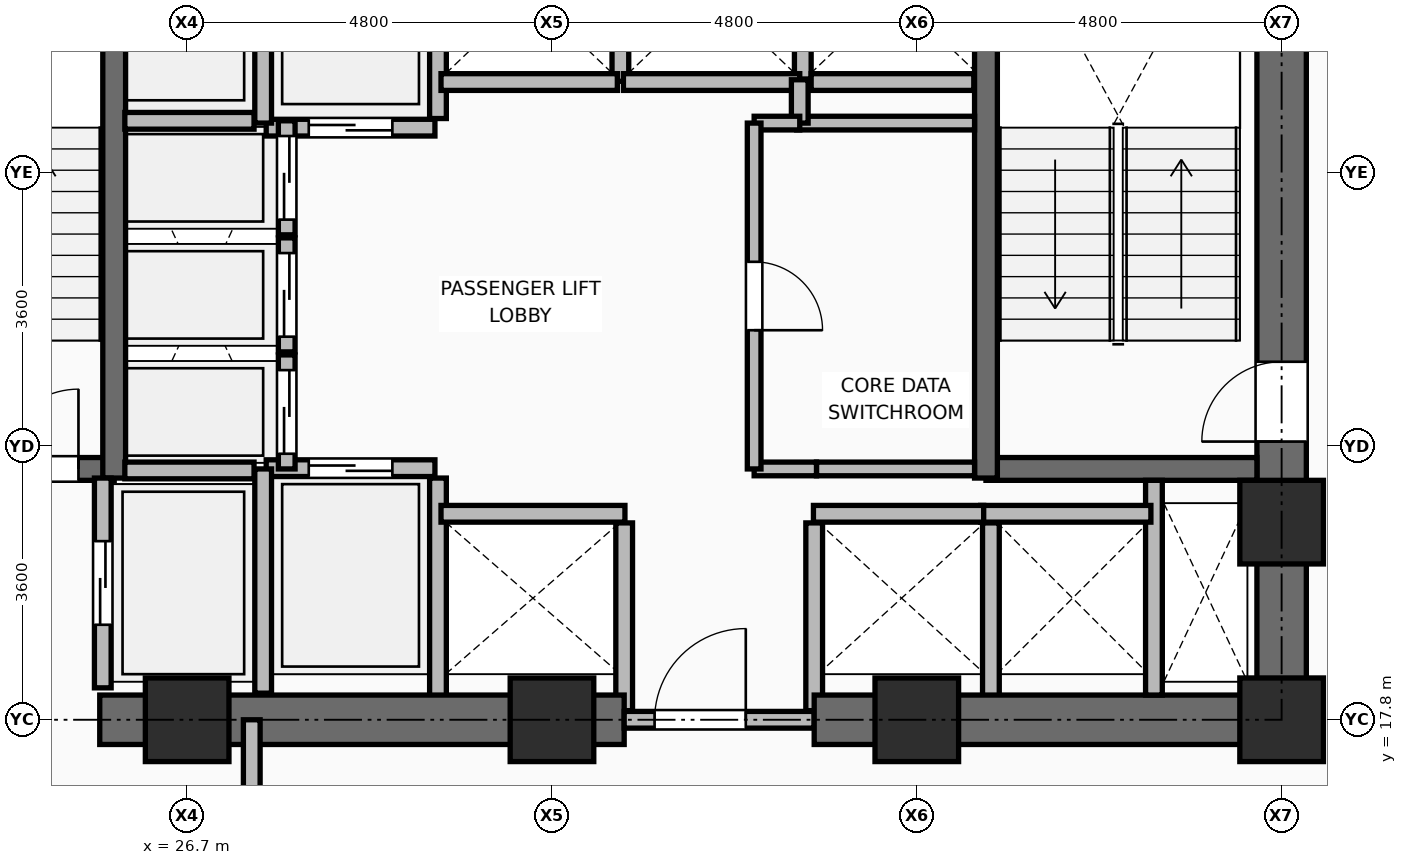
"""IFC4 building model, lengths in metres.
Left out: names, types, materials, properties, quantities, classifications, styles, units other than length and angle.
Written with IfcOpenShell. Run it as: python <this file> out.ifc"""

import sys

from ifc_helpers import new_model, si_unit, direction, frame, frame_2d, origin, origin_2d, place, context, subcontext, project, spatial, rectangle, extrude, element, fill, save


model = new_model("IFC4")
c1 = context("Model", 3, precision=1e-05, world=origin(), true_north=direction((0.0, 1.0)))
c2 = subcontext(c1, "Body", "Model", "MODEL_VIEW")
j1 = project(units=[si_unit("LENGTHUNIT", "METRE"), si_unit("PLANEANGLEUNIT", "RADIAN")], contexts=[c1])
p1 = place(None, origin())
s1 = spatial("IfcSite", under=j1, at=p1, CompositionType="ELEMENT")
p2 = place(p1, origin())
s2 = spatial("IfcBuilding", under=s1, at=p2, CompositionType="ELEMENT")
p3 = place(p2, frame((0.0, 0.0, 72.0)))
s3 = spatial("IfcBuildingStorey", under=s2, at=p3, CompositionType="ELEMENT", Elevation=72.0)
for number, where, z_axis, x_axis in (
    (1, (26.7, 17.8, 0.0), (0.0, 0.0, 1.0), (1.0, 0.0, 0.0)),
    (2, (31.5, 17.8, 0.0), (0.0, 0.0, 1.0), (1.0, 0.0, 0.0)),
    (3, (36.3, 17.8, 0.0), (0.0, 0.0, 1.0), (1.0, 0.0, 0.0)),
    (4, (41.1, 17.8, 0.0), (0.0, 0.0, 1.0), (1.0, 0.0, 0.0)),
    (5, (41.1, 20.4, 0.0), (0.0, 0.0, 1.0), (1.0, 0.0, 0.0)),
):
    element("IfcColumn", number, at=place(p3, frame(where, z_axis=z_axis, x_axis=x_axis)), inside=s3, PredefinedType="COLUMN", context=c2, shape_type="SweptSolid", body=[
        extrude(rectangle(XDim=1.1, YDim=1.1, at=origin_2d()), origin(), (0.0, 0.0, 1.0), 3.75),
    ])
p4 = place(p3, frame((30.0, 18.08, 0.0), z_axis=(0.0, 0.0, 1.0), x_axis=(0.0, 1.0, 0.0)))
e6 = element("IfcWall", 6, at=p4, inside=s3, PredefinedType="PARTITIONING", context=c2, shape_type="SweptSolid", body=[
    extrude(rectangle(XDim=2.9, YDim=0.22, at=frame_2d((1.45, 0.0))), origin(), (0.0, 0.0, 1.0), 3.545),
])
for number, where, z_axis, x_axis in (
    (7, (32.45, 17.92, 0.0), (0.0, 0.0, 1.0), (0.0, 1.0, 0.0)),
    (8, (34.95, 17.92, 0.0), (0.0, 0.0, 1.0), (0.0, 1.0, 0.0)),
):
    element("IfcWall", number, at=place(p3, frame(where, z_axis=z_axis, x_axis=x_axis)), inside=s3, PredefinedType="PARTITIONING", context=c2, shape_type="SweptSolid", body=[
        extrude(rectangle(XDim=2.47, YDim=0.22, at=frame_2d((1.235, 0.0))), origin(), (0.0, 0.0, 1.0), 2.928),
    ])
p5 = place(p3, frame((37.275, 18.08, 0.0), z_axis=(0.0, 0.0, 1.0), x_axis=(0.0, 1.0, 0.0)))
e9 = element("IfcWall", 9, at=p5, inside=s3, PredefinedType="PARTITIONING", context=c2, shape_type="SweptSolid", body=[
    extrude(rectangle(XDim=2.31, YDim=0.22, at=frame_2d((1.155, 0.0))), origin(), (0.0, 0.0, 1.0), 3.545),
])
p6 = place(p3, frame((30.0, 25.71, 0.0), z_axis=(0.0, 0.0, 1.0), x_axis=(0.0, 1.0, 0.0)))
e10 = element("IfcWall", 10, at=p6, inside=s3, PredefinedType="PARTITIONING", context=c2, shape_type="SweptSolid", body=[
    extrude(rectangle(XDim=2.73, YDim=0.22, at=frame_2d((1.365, 0.0))), origin(), (0.0, 0.0, 1.0), 3.545),
])
p7 = place(p3, frame((32.4, 26.2, 0.0), z_axis=(0.0, 0.0, 1.0), x_axis=(0.0, 1.0, 0.0)))
e11 = element("IfcWall", 11, at=p7, inside=s3, PredefinedType="PARTITIONING", context=c2, shape_type="SweptSolid", body=[
    extrude(rectangle(XDim=2.24, YDim=0.22, at=frame_2d((1.12, 0.0))), origin(), (0.0, 0.0, 1.0), 3.545),
])
p8 = place(p3, frame((34.8, 26.23, 0.0), z_axis=(0.0, 0.0, 1.0), x_axis=(0.0, 1.0, 0.0)))
e12 = element("IfcWall", 12, at=p8, inside=s3, PredefinedType="PARTITIONING", context=c2, shape_type="SweptSolid", body=[
    extrude(rectangle(XDim=2.21, YDim=0.22, at=frame_2d((1.105, 0.0))), origin(), (0.0, 0.0, 1.0), 3.545),
])
p9 = place(p3, frame((34.91, 26.19, 0.0), z_axis=(0.0, 0.0, 1.0), x_axis=(1.0, 0.0, 0.0)))
e13 = element("IfcWall", 13, at=p9, inside=s3, PredefinedType="PARTITIONING", context=c2, shape_type="SweptSolid", body=[
    extrude(rectangle(XDim=2.14, YDim=0.22, at=frame_2d((1.07, 0.0))), origin(), (0.0, 0.0, 1.0), 3.545),
])
p10 = place(p3, frame((25.55, 17.8, 0.0), z_axis=(0.0, 0.0, 1.0), x_axis=(1.0, 0.0, 0.0)))
e14 = element("IfcWall", 14, at=p10, inside=s3, PredefinedType="SHEAR", context=c2, shape_type="SweptSolid", body=[
    extrude(rectangle(XDim=6.9, YDim=0.65, at=frame_2d((3.45, 0.0))), origin(), (0.0, 0.0, 1.0), 3.57),
])
p11 = place(p3, frame((32.45, 17.8, 0.0), z_axis=(0.0, 0.0, 1.0), x_axis=(1.0, 0.0, 0.0)))
e15 = element("IfcWall", 15, at=p11, inside=s3, PredefinedType="PARTITIONING", context=c2, shape_type="SweptSolid", body=[
    extrude(rectangle(XDim=2.5, YDim=0.22, at=frame_2d((1.25, 0.0))), origin(), (0.0, 0.0, 1.0), 2.928),
])
p12 = place(p11, frame((0.4, 0.0, 0.0)))
e16 = element("IfcOpeningElement", 16, at=p12, cuts=e15, PredefinedType="OPENING", context=c2, shape_type="SweptSolid", body=[
    extrude(rectangle(XDim=1.2, YDim=2.1, at=frame_2d((0.6, 1.05))), frame((0.0, 0.12, 0.0), z_axis=(0.0, -1.0, 0.0), x_axis=(1.0, 0.0, 0.0)), (0.0, 0.0, 1.0), 0.24),
])
p13 = place(p3, frame((34.95, 17.8, 0.0), z_axis=(0.0, 0.0, 1.0), x_axis=(1.0, 0.0, 0.0)))
e17 = element("IfcWall", 17, at=p13, inside=s3, PredefinedType="SHEAR", context=c2, shape_type="SweptSolid", body=[
    extrude(rectangle(XDim=6.475, YDim=0.65, at=frame_2d((3.238, 0.0))), origin(), (0.0, 0.0, 1.0), 3.57),
])
p14 = place(p3, frame((41.1, 18.125, 0.0), z_axis=(0.0, 0.0, 1.0), x_axis=(0.0, 1.0, 0.0)))
e18 = element("IfcWall", 18, at=p14, inside=s3, PredefinedType="SHEAR", context=c2, shape_type="SweptSolid", body=[
    extrude(rectangle(XDim=14.0, YDim=0.65, at=frame_2d((7.0, 0.0))), origin(), (0.0, 0.0, 1.0), 3.57),
])
p15 = place(p14, frame((3.335, 0.0, 0.0)))
e19 = element("IfcOpeningElement", 19, at=p15, cuts=e18, PredefinedType="OPENING", context=c2, shape_type="SweptSolid", body=[
    extrude(rectangle(XDim=1.05, YDim=2.1, at=frame_2d((0.525, 1.05))), frame((0.0, 0.335, 0.0), z_axis=(0.0, -1.0, 0.0), x_axis=(1.0, 0.0, 0.0)), (0.0, 0.0, 1.0), 0.67),
])
p16 = place(p3, frame((22.225, 21.1, 0.0), z_axis=(0.0, 0.0, 1.0), x_axis=(1.0, 0.0, 0.0)))
e20 = element("IfcWall", 20, at=p16, inside=s3, PredefinedType="SHEAR", context=c2, shape_type="SweptSolid", body=[
    extrude(rectangle(XDim=3.515, YDim=0.3, at=frame_2d((1.757, 0.0))), origin(), (0.0, 0.0, 1.0), 3.57),
])
p17 = place(p16, frame((1.995, 0.0, 0.0)))
e21 = element("IfcOpeningElement", 21, at=p17, cuts=e20, PredefinedType="OPENING", context=c2, shape_type="SweptSolid", body=[
    extrude(rectangle(XDim=1.05, YDim=2.1, at=frame_2d((0.525, 1.05))), frame((0.0, 0.16, 0.0), z_axis=(0.0, -1.0, 0.0), x_axis=(1.0, 0.0, 0.0)), (0.0, 0.0, 1.0), 0.32),
])
p18 = place(p3, frame((25.74, 20.98, 0.0), z_axis=(0.0, 0.0, 1.0), x_axis=(0.0, 1.0, 0.0)))
e22 = element("IfcWall", 22, at=p18, inside=s3, PredefinedType="SHEAR", context=c2, shape_type="SweptSolid", body=[
    extrude(rectangle(XDim=7.99, YDim=0.3, at=frame_2d((3.995, 0.0))), origin(), (0.0, 0.0, 1.0), 3.57),
])
p19 = place(p3, frame((37.21, 21.1, 0.0), z_axis=(0.0, 0.0, 1.0), x_axis=(1.0, 0.0, 0.0)))
e23 = element("IfcWall", 23, at=p19, inside=s3, PredefinedType="SHEAR", context=c2, shape_type="SweptSolid", body=[
    extrude(rectangle(XDim=3.565, YDim=0.3, at=frame_2d((1.782, 0.0))), origin(), (0.0, 0.0, 1.0), 3.57),
])
p20 = place(p3, frame((37.21, 20.98, 0.0), z_axis=(0.0, 0.0, 1.0), x_axis=(0.0, 1.0, 0.0)))
e24 = element("IfcWall", 24, at=p20, inside=s3, PredefinedType="SHEAR", context=c2, shape_type="SweptSolid", body=[
    extrude(rectangle(XDim=7.99, YDim=0.3, at=frame_2d((3.995, 0.0))), origin(), (0.0, 0.0, 1.0), 3.57),
])
p21 = place(p3, frame((39.42, 18.125, 0.0), z_axis=(0.0, 0.0, 1.0), x_axis=(0.0, 1.0, 0.0)))
e25 = element("IfcWall", 25, at=p21, inside=s3, PredefinedType="PARTITIONING", context=c2, shape_type="SweptSolid", body=[
    extrude(rectangle(XDim=2.825, YDim=0.22, at=frame_2d((1.413, 0.0))), origin(), (0.0, 0.0, 1.0), 3.55),
])
p22 = place(p3, frame((25.59, 18.22, 0.0), z_axis=(0.0, 0.0, 1.0), x_axis=(0.0, 1.0, 0.0)))
e26 = element("IfcWall", 26, at=p22, inside=s3, PredefinedType="PARTITIONING", context=c2, shape_type="SweptSolid", body=[
    extrude(rectangle(XDim=2.76, YDim=0.22, at=frame_2d((1.38, 0.0))), origin(), (0.0, 0.0, 1.0), 3.55),
])
p23 = place(p22, frame((0.83, 0.0, 0.0)))
e27 = element("IfcOpeningElement", 27, at=p23, cuts=e26, PredefinedType="OPENING", context=c2, shape_type="SweptSolid", body=[
    extrude(rectangle(XDim=1.1, YDim=2.2, at=frame_2d((0.55, 1.1))), frame((0.0, 0.12, 0.0), z_axis=(0.0, -1.0, 0.0), x_axis=(1.0, 0.0, 0.0)), (0.0, 0.0, 1.0), 0.24),
])
p24 = place(p3, frame((27.74, 21.11, 0.0), z_axis=(0.0, 0.0, 1.0), x_axis=(1.0, 0.0, 0.0)))
e28 = element("IfcWall", 28, at=p24, inside=s3, PredefinedType="PARTITIONING", context=c2, shape_type="SweptSolid", body=[
    extrude(rectangle(XDim=2.22, YDim=0.22, at=frame_2d((1.11, 0.0))), origin(), (0.0, 0.0, 1.0), 3.55),
])
p25 = place(p24, frame((0.56, 0.0, 0.0)))
e29 = element("IfcOpeningElement", 29, at=p25, cuts=e28, PredefinedType="OPENING", context=c2, shape_type="SweptSolid", body=[
    extrude(rectangle(XDim=1.1, YDim=2.2, at=frame_2d((0.55, 1.1))), frame((0.0, 0.12, 0.0), z_axis=(0.0, -1.0, 0.0), x_axis=(1.0, 0.0, 0.0)), (0.0, 0.0, 1.0), 0.24),
])
p26 = place(p3, frame((27.74, 25.59, 0.0), z_axis=(0.0, 0.0, 1.0), x_axis=(1.0, 0.0, 0.0)))
e30 = element("IfcWall", 30, at=p26, inside=s3, PredefinedType="PARTITIONING", context=c2, shape_type="SweptSolid", body=[
    extrude(rectangle(XDim=2.22, YDim=0.22, at=frame_2d((1.11, 0.0))), origin(), (0.0, 0.0, 1.0), 3.55),
])
p27 = place(p26, frame((0.56, 0.0, 0.0)))
e31 = element("IfcOpeningElement", 31, at=p27, cuts=e30, PredefinedType="OPENING", context=c2, shape_type="SweptSolid", body=[
    extrude(rectangle(XDim=1.1, YDim=2.2, at=frame_2d((0.55, 1.1))), frame((0.0, 0.12, 0.0), z_axis=(0.0, -1.0, 0.0), x_axis=(1.0, 0.0, 0.0)), (0.0, 0.0, 1.0), 0.24),
])
p28 = place(p3, frame((30.04, 20.51, 0.0), z_axis=(0.0, 0.0, 1.0), x_axis=(1.0, 0.0, 0.0)))
e32 = element("IfcWall", 32, at=p28, inside=s3, PredefinedType="PARTITIONING", context=c2, shape_type="SweptSolid", body=[
    extrude(rectangle(XDim=2.42, YDim=0.22, at=frame_2d((1.21, 0.0))), origin(), (0.0, 0.0, 1.0), 3.55),
])
for number, where, z_axis, x_axis in (
    (33, (37.14, 20.51, 0.0), (0.0, 0.0, 1.0), (1.0, 0.0, 0.0)),
    (34, (34.94, 20.51, 0.0), (0.0, 0.0, 1.0), (1.0, 0.0, 0.0)),
):
    element("IfcWall", number, at=place(p3, frame(where, z_axis=z_axis, x_axis=x_axis)), inside=s3, PredefinedType="PARTITIONING", context=c2, shape_type="SweptSolid", body=[
        extrude(rectangle(XDim=2.24, YDim=0.22, at=frame_2d((1.12, 0.0))), origin(), (0.0, 0.0, 1.0), 3.55),
    ])
for number, where, z_axis, x_axis in (
    (35, (30.04, 26.19, 0.0), (0.0, 0.0, 1.0), (1.0, 0.0, 0.0)),
    (36, (32.44, 26.19, 0.0), (0.0, 0.0, 1.0), (1.0, 0.0, 0.0)),
):
    element("IfcWall", number, at=place(p3, frame(where, z_axis=z_axis, x_axis=x_axis)), inside=s3, PredefinedType="PARTITIONING", context=c2, shape_type="SweptSolid", body=[
        extrude(rectangle(XDim=2.32, YDim=0.22, at=frame_2d((1.16, 0.0))), origin(), (0.0, 0.0, 1.0), 3.55),
    ])
p29 = place(p3, frame((28.01, 21.1, 0.0), z_axis=(0.0, 0.0, 1.0), x_axis=(0.0, 1.0, 0.0)))
e37 = element("IfcWall", 37, at=p29, inside=s3, PredefinedType="PARTITIONING", context=c2, shape_type="SweptSolid", body=[
    extrude(rectangle(XDim=1.5, YDim=0.22, at=frame_2d((0.75, 0.0))), origin(), (0.0, 0.0, 1.0), 3.55),
])
p30 = place(p29, frame((0.2, 0.0, 0.0)))
e38 = element("IfcOpeningElement", 38, at=p30, cuts=e37, PredefinedType="OPENING", context=c2, shape_type="SweptSolid", body=[
    extrude(rectangle(XDim=1.1, YDim=2.2, at=frame_2d((0.55, 1.1))), frame((0.0, 0.12, 0.0), z_axis=(0.0, -1.0, 0.0), x_axis=(1.0, 0.0, 0.0)), (0.0, 0.0, 1.0), 0.24),
])
p31 = place(p3, frame((28.01, 22.64, 0.0), z_axis=(0.0, 0.0, 1.0), x_axis=(0.0, 1.0, 0.0)))
e39 = element("IfcWall", 39, at=p31, inside=s3, PredefinedType="PARTITIONING", context=c2, shape_type="SweptSolid", body=[
    extrude(rectangle(XDim=1.5, YDim=0.22, at=frame_2d((0.75, 0.0))), origin(), (0.0, 0.0, 1.0), 3.55),
])
p32 = place(p31, frame((0.2, 0.0, 0.0)))
e40 = element("IfcOpeningElement", 40, at=p32, cuts=e39, PredefinedType="OPENING", context=c2, shape_type="SweptSolid", body=[
    extrude(rectangle(XDim=1.1, YDim=2.2, at=frame_2d((0.55, 1.1))), frame((0.0, 0.12, 0.0), z_axis=(0.0, -1.0, 0.0), x_axis=(1.0, 0.0, 0.0)), (0.0, 0.0, 1.0), 0.24),
])
p33 = place(p3, frame((28.01, 24.18, 0.0), z_axis=(0.0, 0.0, 1.0), x_axis=(0.0, 1.0, 0.0)))
e41 = element("IfcWall", 41, at=p33, inside=s3, PredefinedType="PARTITIONING", context=c2, shape_type="SweptSolid", body=[
    extrude(rectangle(XDim=1.5, YDim=0.22, at=frame_2d((0.75, 0.0))), origin(), (0.0, 0.0, 1.0), 3.55),
])
p34 = place(p33, frame((0.2, 0.0, 0.0)))
e42 = element("IfcOpeningElement", 42, at=p34, cuts=e41, PredefinedType="OPENING", context=c2, shape_type="SweptSolid", body=[
    extrude(rectangle(XDim=1.1, YDim=2.2, at=frame_2d((0.55, 1.1))), frame((0.0, 0.12, 0.0), z_axis=(0.0, -1.0, 0.0), x_axis=(1.0, 0.0, 0.0)), (0.0, 0.0, 1.0), 0.24),
])
p35 = place(p3, frame((27.7, 18.15, 0.0), z_axis=(0.0, 0.0, 1.0), x_axis=(0.0, 1.0, 0.0)))
e43 = element("IfcWall", 43, at=p35, inside=s3, PredefinedType="PARTITIONING", context=c2, shape_type="SweptSolid", body=[
    extrude(rectangle(XDim=2.95, YDim=0.22, at=frame_2d((1.475, 0.0))), origin(), (0.0, 0.0, 1.0), 3.55),
])
p36 = place(p3, frame((27.7, 25.65, 0.0), z_axis=(0.0, 0.0, 1.0), x_axis=(0.0, 1.0, 0.0)))
e44 = element("IfcWall", 44, at=p36, inside=s3, PredefinedType="PARTITIONING", context=c2, shape_type="SweptSolid", body=[
    extrude(rectangle(XDim=3.0, YDim=0.22, at=frame_2d((1.5, 0.0))), origin(), (0.0, 0.0, 1.0), 3.55),
])
for number, where, z_axis, x_axis in (
    (45, (25.88, 21.08, 0.0), (0.0, 0.0, 1.0), (1.0, 0.0, 0.0)),
    (46, (25.88, 25.68, 0.0), (0.0, 0.0, 1.0), (1.0, 0.0, 0.0)),
):
    element("IfcWall", number, at=place(p3, frame(where, z_axis=z_axis, x_axis=x_axis)), inside=s3, PredefinedType="PARTITIONING", context=c2, shape_type="SweptSolid", body=[
        extrude(rectangle(XDim=1.7, YDim=0.22, at=frame_2d((0.85, 0.0))), origin(), (0.0, 0.0, 1.0), 3.55),
    ])
p37 = place(p3, frame((34.98, 21.1, 0.0), z_axis=(0.0, 0.0, 1.0), x_axis=(1.0, 0.0, 0.0)))
e47 = element("IfcWall", 47, at=p37, inside=s3, PredefinedType="PARTITIONING", context=c2, shape_type="SweptSolid", body=[
    extrude(rectangle(XDim=2.08, YDim=0.18, at=frame_2d((1.04, 0.0))), origin(), (0.0, 0.0, 1.0), 3.55),
])
p38 = place(p3, frame((34.72, 25.65, 0.0), z_axis=(0.0, 0.0, 1.0), x_axis=(1.0, 0.0, 0.0)))
e48 = element("IfcWall", 48, at=p38, inside=s3, PredefinedType="PARTITIONING", context=c2, shape_type="SweptSolid", body=[
    extrude(rectangle(XDim=2.34, YDim=0.18, at=frame_2d((1.17, 0.0))), origin(), (0.0, 0.0, 1.0), 3.55),
])
p39 = place(p3, frame((34.76, 25.65, 0.0), z_axis=(0.0, 0.0, 1.0), x_axis=(0.0, 1.0, 0.0)))
e49 = element("IfcWall", 49, at=p39, inside=s3, PredefinedType="PARTITIONING", context=c2, shape_type="SweptSolid", body=[
    extrude(rectangle(XDim=0.57, YDim=0.22, at=frame_2d((0.285, 0.0))), origin(), (0.0, 0.0, 1.0), 3.55),
])
p40 = place(p3, frame((34.16, 21.1, 0.0), z_axis=(0.0, 0.0, 1.0), x_axis=(1.0, 0.0, 0.0)))
e50 = element("IfcWall", 50, at=p40, inside=s3, PredefinedType="PARTITIONING", context=c2, shape_type="SweptSolid", body=[
    extrude(rectangle(XDim=0.82, YDim=0.18, at=frame_2d((0.41, 0.0))), origin(), (0.0, 0.0, 1.0), 3.55),
])
p41 = place(p3, frame((34.16, 25.65, 0.0), z_axis=(0.0, 0.0, 1.0), x_axis=(1.0, 0.0, 0.0)))
e51 = element("IfcWall", 51, at=p41, inside=s3, PredefinedType="PARTITIONING", context=c2, shape_type="SweptSolid", body=[
    extrude(rectangle(XDim=0.6, YDim=0.18, at=frame_2d((0.3, 0.0))), origin(), (0.0, 0.0, 1.0), 3.55),
])
p42 = place(p3, frame((34.16, 21.1, 0.0), z_axis=(0.0, 0.0, 1.0), x_axis=(0.0, 1.0, 0.0)))
e52 = element("IfcWall", 52, at=p42, inside=s3, PredefinedType="PARTITIONING", context=c2, shape_type="SweptSolid", body=[
    extrude(rectangle(XDim=4.55, YDim=0.18, at=frame_2d((2.275, 0.0))), origin(), (0.0, 0.0, 1.0), 3.55),
])
p43 = place(p42, frame((1.825, 0.0, 0.0)))
e53 = element("IfcOpeningElement", 53, at=p43, cuts=e52, PredefinedType="OPENING", context=c2, shape_type="SweptSolid", body=[
    extrude(rectangle(XDim=0.9, YDim=2.1, at=frame_2d((0.45, 1.05))), frame((0.0, 0.1, 0.0), z_axis=(0.0, -1.0, 0.0), x_axis=(1.0, 0.0, 0.0)), (0.0, 0.0, 1.0), 0.2),
])
p44 = place(p3, frame((27.55, 14.35, 0.0), z_axis=(0.0, 0.0, 1.0), x_axis=(0.0, 1.0, 0.0)))
e54 = element("IfcWall", 54, at=p44, inside=s3, PredefinedType="PARTITIONING", context=c2, shape_type="SweptSolid", body=[
    extrude(rectangle(XDim=3.45, YDim=0.22, at=frame_2d((1.725, 0.0))), origin(), (0.0, 0.0, 1.0), 2.928),
])
p45 = place(p44, frame((1.175, 0.0, 0.0)))
e55 = element("IfcOpeningElement", 55, at=p45, cuts=e54, PredefinedType="OPENING", context=c2, shape_type="SweptSolid", body=[
    extrude(rectangle(XDim=1.1, YDim=2.1, at=frame_2d((0.55, 1.05))), frame((0.0, 0.12, 0.0), z_axis=(0.0, -1.0, 0.0), x_axis=(1.0, 0.0, 0.0)), (0.0, 0.0, 1.0), 0.24),
])
p46 = place(p12, origin())
e56 = element("IfcDoor", 56, at=p46, inside=s3, OperationType="SINGLE_SWING_RIGHT", PredefinedType="DOOR", context=c2, shape_type="SweptSolid", body=[
    extrude(rectangle(XDim=1.2, YDim=2.1, at=frame_2d((0.6, 1.05))), frame((0.0, 0.025, 0.0), z_axis=(0.0, -1.0, 0.0), x_axis=(1.0, 0.0, 0.0)), (0.0, 0.0, 1.0), 0.05),
])
fill(e16, e56)
p47 = place(p17, origin())
e57 = element("IfcDoor", 57, at=p47, inside=s3, OperationType="SINGLE_SWING_RIGHT", PredefinedType="DOOR", context=c2, shape_type="SweptSolid", body=[
    extrude(rectangle(XDim=1.05, YDim=2.1, at=frame_2d((0.525, 1.05))), frame((0.0, 0.025, 0.0), z_axis=(0.0, -1.0, 0.0), x_axis=(1.0, 0.0, 0.0)), (0.0, 0.0, 1.0), 0.05),
])
fill(e21, e57)
p48 = place(p15, origin())
e58 = element("IfcDoor", 58, at=p48, inside=s3, OperationType="SINGLE_SWING_LEFT", PredefinedType="DOOR", context=c2, shape_type="SweptSolid", body=[
    extrude(rectangle(XDim=1.05, YDim=2.1, at=frame_2d((0.525, 1.05))), frame((0.0, 0.025, 0.0), z_axis=(0.0, -1.0, 0.0), x_axis=(1.0, 0.0, 0.0)), (0.0, 0.0, 1.0), 0.05),
])
fill(e19, e58)
p49 = place(p23, origin())
e59 = element("IfcDoor", 59, at=p49, inside=s3, OperationType="DOUBLE_DOOR_SLIDING", PredefinedType="DOOR", context=c2, shape_type="SweptSolid", body=[
    extrude(rectangle(XDim=1.1, YDim=2.2, at=frame_2d((0.55, 1.1))), frame((0.0, 0.025, 0.0), z_axis=(0.0, -1.0, 0.0), x_axis=(1.0, 0.0, 0.0)), (0.0, 0.0, 1.0), 0.05),
])
fill(e27, e59)
p50 = place(p25, origin())
e60 = element("IfcDoor", 60, at=p50, inside=s3, OperationType="DOUBLE_DOOR_SLIDING", PredefinedType="DOOR", context=c2, shape_type="SweptSolid", body=[
    extrude(rectangle(XDim=1.1, YDim=2.2, at=frame_2d((0.55, 1.1))), frame((0.0, 0.025, 0.0), z_axis=(0.0, -1.0, 0.0), x_axis=(1.0, 0.0, 0.0)), (0.0, 0.0, 1.0), 0.05),
])
fill(e29, e60)
p51 = place(p27, frame((1.1, 0.0, 0.0), z_axis=(0.0, 0.0, 1.0), x_axis=(-1.0, 0.0, 0.0)))
e61 = element("IfcDoor", 61, at=p51, inside=s3, OperationType="DOUBLE_DOOR_SLIDING", PredefinedType="DOOR", context=c2, shape_type="SweptSolid", body=[
    extrude(rectangle(XDim=1.1, YDim=2.2, at=frame_2d((0.55, 1.1))), frame((0.0, 0.025, 0.0), z_axis=(0.0, -1.0, 0.0), x_axis=(1.0, 0.0, 0.0)), (0.0, 0.0, 1.0), 0.05),
])
fill(e31, e61)
p52 = place(p30, frame((1.1, 0.0, 0.0), z_axis=(0.0, 0.0, 1.0), x_axis=(-1.0, 0.0, 0.0)))
e62 = element("IfcDoor", 62, at=p52, inside=s3, OperationType="DOUBLE_DOOR_SLIDING", PredefinedType="DOOR", context=c2, shape_type="SweptSolid", body=[
    extrude(rectangle(XDim=1.1, YDim=2.2, at=frame_2d((0.55, 1.1))), frame((0.0, 0.025, 0.0), z_axis=(0.0, -1.0, 0.0), x_axis=(1.0, 0.0, 0.0)), (0.0, 0.0, 1.0), 0.05),
])
fill(e38, e62)
p53 = place(p32, frame((1.1, 0.0, 0.0), z_axis=(0.0, 0.0, 1.0), x_axis=(-1.0, 0.0, 0.0)))
e63 = element("IfcDoor", 63, at=p53, inside=s3, OperationType="DOUBLE_DOOR_SLIDING", PredefinedType="DOOR", context=c2, shape_type="SweptSolid", body=[
    extrude(rectangle(XDim=1.1, YDim=2.2, at=frame_2d((0.55, 1.1))), frame((0.0, 0.025, 0.0), z_axis=(0.0, -1.0, 0.0), x_axis=(1.0, 0.0, 0.0)), (0.0, 0.0, 1.0), 0.05),
])
fill(e40, e63)
p54 = place(p34, frame((1.1, 0.0, 0.0), z_axis=(0.0, 0.0, 1.0), x_axis=(-1.0, 0.0, 0.0)))
e64 = element("IfcDoor", 64, at=p54, inside=s3, OperationType="DOUBLE_DOOR_SLIDING", PredefinedType="DOOR", context=c2, shape_type="SweptSolid", body=[
    extrude(rectangle(XDim=1.1, YDim=2.2, at=frame_2d((0.55, 1.1))), frame((0.0, 0.025, 0.0), z_axis=(0.0, -1.0, 0.0), x_axis=(1.0, 0.0, 0.0)), (0.0, 0.0, 1.0), 0.05),
])
fill(e42, e64)
p55 = place(p43, frame((0.9, 0.0, 0.0), z_axis=(0.0, 0.0, 1.0), x_axis=(-1.0, 0.0, 0.0)))
e65 = element("IfcDoor", 65, at=p55, inside=s3, OperationType="SINGLE_SWING_RIGHT", PredefinedType="DOOR", context=c2, shape_type="SweptSolid", body=[
    extrude(rectangle(XDim=0.9, YDim=2.1, at=frame_2d((0.45, 1.05))), frame((0.0, 0.025, 0.0), z_axis=(0.0, -1.0, 0.0), x_axis=(1.0, 0.0, 0.0)), (0.0, 0.0, 1.0), 0.05),
])
fill(e53, e65)
save(model, sys.argv[1])
